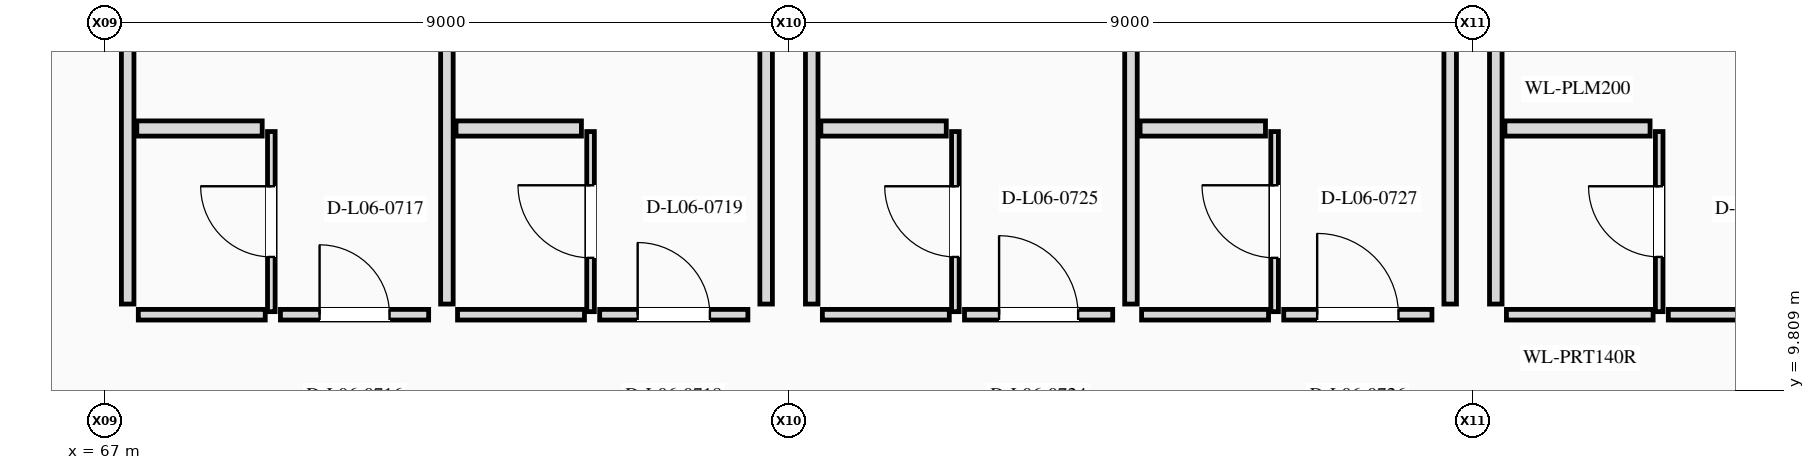
"""IFC4 building model, lengths in metres.
Left out: names, types, materials, properties, quantities, classifications, styles, units other than length and angle.
Written with IfcOpenShell. Run it as: python <this file> out.ifc"""

import sys

from ifc_helpers import new_model, si_unit, direction, frame, frame_2d, origin, place, context, subcontext, project, spatial, rectangle, extrude, element, fill, save


model = new_model("IFC4")
c1 = context("Model", 3, precision=1e-05, world=origin(), true_north=direction((0.0, 1.0)))
c2 = subcontext(c1, "Body", "Model", "MODEL_VIEW")
j1 = project(units=[si_unit("LENGTHUNIT", "METRE"), si_unit("PLANEANGLEUNIT", "RADIAN")], contexts=[c1])
p1 = place(None, origin())
s1 = spatial("IfcSite", under=j1, at=p1, CompositionType="ELEMENT")
p2 = place(p1, origin())
s2 = spatial("IfcBuilding", under=s1, at=p2, CompositionType="ELEMENT")
p3 = place(p2, frame((0.0, 0.0, 27.0)))
s3 = spatial("IfcBuildingStorey", under=s2, at=p3, CompositionType="ELEMENT", Elevation=27.0)
p4 = place(p3, frame((67.44, 10.8, 0.0), z_axis=(0.0, 0.0, 1.0), x_axis=(1.0, 0.0, 0.0)))
e1 = element("IfcWall", 1, at=p4, inside=s3, PredefinedType="PARTITIONING", context=c2, shape_type="SweptSolid", body=[
    extrude(rectangle(XDim=1.67, YDim=0.14, at=frame_2d((0.835, 0.0))), origin(), (0.0, 0.0, 1.0), 3.29),
])
p5 = place(p3, frame((69.31, 10.8, 0.0), z_axis=(0.0, 0.0, 1.0), x_axis=(1.0, 0.0, 0.0)))
e2 = element("IfcWall", 2, at=p5, inside=s3, PredefinedType="PARTITIONING", context=c2, shape_type="SweptSolid", body=[
    extrude(rectangle(XDim=1.95, YDim=0.14, at=frame_2d((0.975, 0.0))), origin(), (0.0, 0.0, 1.0), 3.29),
])
p6 = place(p5, frame((0.515, 0.0, 0.0)))
e3 = element("IfcOpeningElement", 3, at=p6, cuts=e2, PredefinedType="OPENING", context=c2, shape_type="SweptSolid", body=[
    extrude(rectangle(XDim=0.92, YDim=2.3, at=frame_2d((0.46, 1.15))), frame((0.0, 0.08, 0.0), z_axis=(0.0, -1.0, 0.0), x_axis=(1.0, 0.0, 0.0)), (0.0, 0.0, 1.0), 0.16),
])
p7 = place(p3, frame((67.3, 10.94, 0.0), z_axis=(0.0, 0.0, 1.0), x_axis=(0.0, 1.0, 0.0)))
e4 = element("IfcWall", 4, at=p7, inside=s3, PredefinedType="PARTITIONING", context=c2, shape_type="SweptSolid", body=[
    extrude(rectangle(XDim=8.012, YDim=0.165, at=frame_2d((4.006, 0.0))), origin(), (0.0, 0.0, 1.0), 2.619),
])
p8 = place(p3, frame((71.5, 10.94, 0.0), z_axis=(0.0, 0.0, 1.0), x_axis=(0.0, 1.0, 0.0)))
e5 = element("IfcWall", 5, at=p8, inside=s3, PredefinedType="PARTITIONING", context=c2, shape_type="SweptSolid", body=[
    extrude(rectangle(XDim=8.012, YDim=0.165, at=frame_2d((4.006, 0.0))), origin(), (0.0, 0.0, 1.0), 2.703),
])
p9 = place(p3, frame((69.19, 10.84, 0.0), z_axis=(0.0, 0.0, 1.0), x_axis=(0.0, 1.0, 0.0)))
e6 = element("IfcWall", 6, at=p9, inside=s3, PredefinedType="PARTITIONING", context=c2, shape_type="SweptSolid", body=[
    extrude(rectangle(XDim=2.37, YDim=0.1, at=frame_2d((1.185, 0.0))), origin(), (0.0, 0.0, 1.0), 2.898),
])
p10 = place(p9, frame((0.72, 0.0, 0.0)))
e7 = element("IfcOpeningElement", 7, at=p10, cuts=e6, PredefinedType="OPENING", context=c2, shape_type="SweptSolid", body=[
    extrude(rectangle(XDim=0.93, YDim=2.14, at=frame_2d((0.465, 1.07))), frame((0.0, 0.06, 0.0), z_axis=(0.0, -1.0, 0.0), x_axis=(1.0, 0.0, 0.0)), (0.0, 0.0, 1.0), 0.12),
])
p11 = place(p3, frame((67.42, 13.25, 0.0), z_axis=(0.0, 0.0, 1.0), x_axis=(1.0, 0.0, 0.0)))
e8 = element("IfcWall", 8, at=p11, inside=s3, PredefinedType="PLUMBINGWALL", context=c2, shape_type="SweptSolid", body=[
    extrude(rectangle(XDim=1.65, YDim=0.2, at=frame_2d((0.825, 0.0))), origin(), (0.0, 0.0, 1.0), 3.29),
])
p12 = place(p3, frame((71.64, 10.8, 0.0), z_axis=(0.0, 0.0, 1.0), x_axis=(1.0, 0.0, 0.0)))
e9 = element("IfcWall", 9, at=p12, inside=s3, PredefinedType="PARTITIONING", context=c2, shape_type="SweptSolid", body=[
    extrude(rectangle(XDim=1.67, YDim=0.14, at=frame_2d((0.835, 0.0))), origin(), (0.0, 0.0, 1.0), 3.29),
])
p13 = place(p3, frame((73.51, 10.8, 0.0), z_axis=(0.0, 0.0, 1.0), x_axis=(1.0, 0.0, 0.0)))
e10 = element("IfcWall", 10, at=p13, inside=s3, PredefinedType="PARTITIONING", context=c2, shape_type="SweptSolid", body=[
    extrude(rectangle(XDim=1.95, YDim=0.14, at=frame_2d((0.975, 0.0))), origin(), (0.0, 0.0, 1.0), 3.29),
])
p14 = place(p13, frame((0.5, 0.0, 0.0)))
e11 = element("IfcOpeningElement", 11, at=p14, cuts=e10, PredefinedType="OPENING", context=c2, shape_type="SweptSolid", body=[
    extrude(rectangle(XDim=0.95, YDim=2.3, at=frame_2d((0.475, 1.15))), frame((0.0, 0.08, 0.0), z_axis=(0.0, -1.0, 0.0), x_axis=(1.0, 0.0, 0.0)), (0.0, 0.0, 1.0), 0.16),
])
p15 = place(p3, frame((75.7, 10.94, 0.0), z_axis=(0.0, 0.0, 1.0), x_axis=(0.0, 1.0, 0.0)))
e12 = element("IfcWall", 12, at=p15, inside=s3, PredefinedType="PARTITIONING", context=c2, shape_type="SweptSolid", body=[
    extrude(rectangle(XDim=8.012, YDim=0.165, at=frame_2d((4.006, 0.0))), origin(), (0.0, 0.0, 1.0), 2.619),
])
p16 = place(p3, frame((73.39, 10.84, 0.0), z_axis=(0.0, 0.0, 1.0), x_axis=(0.0, 1.0, 0.0)))
e13 = element("IfcWall", 13, at=p16, inside=s3, PredefinedType="PARTITIONING", context=c2, shape_type="SweptSolid", body=[
    extrude(rectangle(XDim=2.37, YDim=0.1, at=frame_2d((1.185, 0.0))), origin(), (0.0, 0.0, 1.0), 2.898),
])
p17 = place(p16, frame((0.708, 0.0, 0.0)))
e14 = element("IfcOpeningElement", 14, at=p17, cuts=e13, PredefinedType="OPENING", context=c2, shape_type="SweptSolid", body=[
    extrude(rectangle(XDim=0.955, YDim=2.14, at=frame_2d((0.478, 1.07))), frame((0.0, 0.06, 0.0), z_axis=(0.0, -1.0, 0.0), x_axis=(1.0, 0.0, 0.0)), (0.0, 0.0, 1.0), 0.12),
])
p18 = place(p3, frame((71.62, 13.25, 0.0), z_axis=(0.0, 0.0, 1.0), x_axis=(1.0, 0.0, 0.0)))
e15 = element("IfcWall", 15, at=p18, inside=s3, PredefinedType="PLUMBINGWALL", context=c2, shape_type="SweptSolid", body=[
    extrude(rectangle(XDim=1.65, YDim=0.2, at=frame_2d((0.825, 0.0))), origin(), (0.0, 0.0, 1.0), 3.29),
])
p19 = place(p3, frame((76.44, 10.8, 0.0), z_axis=(0.0, 0.0, 1.0), x_axis=(1.0, 0.0, 0.0)))
e16 = element("IfcWall", 16, at=p19, inside=s3, PredefinedType="PARTITIONING", context=c2, shape_type="SweptSolid", body=[
    extrude(rectangle(XDim=1.67, YDim=0.14, at=frame_2d((0.835, 0.0))), origin(), (0.0, 0.0, 1.0), 3.29),
])
p20 = place(p3, frame((78.31, 10.8, 0.0), z_axis=(0.0, 0.0, 1.0), x_axis=(1.0, 0.0, 0.0)))
e17 = element("IfcWall", 17, at=p20, inside=s3, PredefinedType="PARTITIONING", context=c2, shape_type="SweptSolid", body=[
    extrude(rectangle(XDim=1.95, YDim=0.14, at=frame_2d((0.975, 0.0))), origin(), (0.0, 0.0, 1.0), 3.29),
])
p21 = place(p20, frame((0.455, 0.0, 0.0)))
e18 = element("IfcOpeningElement", 18, at=p21, cuts=e17, PredefinedType="OPENING", context=c2, shape_type="SweptSolid", body=[
    extrude(rectangle(XDim=1.04, YDim=2.4, at=frame_2d((0.52, 1.2))), frame((0.0, 0.08, 0.0), z_axis=(0.0, -1.0, 0.0), x_axis=(1.0, 0.0, 0.0)), (0.0, 0.0, 1.0), 0.16),
])
p22 = place(p3, frame((76.3, 10.94, 0.0), z_axis=(0.0, 0.0, 1.0), x_axis=(0.0, 1.0, 0.0)))
e19 = element("IfcWall", 19, at=p22, inside=s3, PredefinedType="PARTITIONING", context=c2, shape_type="SweptSolid", body=[
    extrude(rectangle(XDim=8.012, YDim=0.165, at=frame_2d((4.006, 0.0))), origin(), (0.0, 0.0, 1.0), 2.619),
])
p23 = place(p3, frame((80.5, 10.94, 0.0), z_axis=(0.0, 0.0, 1.0), x_axis=(0.0, 1.0, 0.0)))
e20 = element("IfcWall", 20, at=p23, inside=s3, PredefinedType="PARTITIONING", context=c2, shape_type="SweptSolid", body=[
    extrude(rectangle(XDim=8.012, YDim=0.165, at=frame_2d((4.006, 0.0))), origin(), (0.0, 0.0, 1.0), 2.703),
])
p24 = place(p3, frame((78.19, 10.84, 0.0), z_axis=(0.0, 0.0, 1.0), x_axis=(0.0, 1.0, 0.0)))
e21 = element("IfcWall", 21, at=p24, inside=s3, PredefinedType="PARTITIONING", context=c2, shape_type="SweptSolid", body=[
    extrude(rectangle(XDim=2.37, YDim=0.1, at=frame_2d((1.185, 0.0))), origin(), (0.0, 0.0, 1.0), 2.898),
])
p25 = place(p24, frame((0.72, 0.0, 0.0)))
e22 = element("IfcOpeningElement", 22, at=p25, cuts=e21, PredefinedType="OPENING", context=c2, shape_type="SweptSolid", body=[
    extrude(rectangle(XDim=0.93, YDim=2.22, at=frame_2d((0.465, 1.11))), frame((0.0, 0.06, 0.0), z_axis=(0.0, -1.0, 0.0), x_axis=(1.0, 0.0, 0.0)), (0.0, 0.0, 1.0), 0.12),
])
p26 = place(p3, frame((76.42, 13.25, 0.0), z_axis=(0.0, 0.0, 1.0), x_axis=(1.0, 0.0, 0.0)))
e23 = element("IfcWall", 23, at=p26, inside=s3, PredefinedType="PLUMBINGWALL", context=c2, shape_type="SweptSolid", body=[
    extrude(rectangle(XDim=1.65, YDim=0.2, at=frame_2d((0.825, 0.0))), origin(), (0.0, 0.0, 1.0), 3.29),
])
p27 = place(p3, frame((80.64, 10.8, 0.0), z_axis=(0.0, 0.0, 1.0), x_axis=(1.0, 0.0, 0.0)))
e24 = element("IfcWall", 24, at=p27, inside=s3, PredefinedType="PARTITIONING", context=c2, shape_type="SweptSolid", body=[
    extrude(rectangle(XDim=1.67, YDim=0.14, at=frame_2d((0.835, 0.0))), origin(), (0.0, 0.0, 1.0), 3.29),
])
p28 = place(p3, frame((82.51, 10.8, 0.0), z_axis=(0.0, 0.0, 1.0), x_axis=(1.0, 0.0, 0.0)))
e25 = element("IfcWall", 25, at=p28, inside=s3, PredefinedType="PARTITIONING", context=c2, shape_type="SweptSolid", body=[
    extrude(rectangle(XDim=1.95, YDim=0.14, at=frame_2d((0.975, 0.0))), origin(), (0.0, 0.0, 1.0), 3.29),
])
p29 = place(p28, frame((0.44, 0.0, 0.0)))
e26 = element("IfcOpeningElement", 26, at=p29, cuts=e25, PredefinedType="OPENING", context=c2, shape_type="SweptSolid", body=[
    extrude(rectangle(XDim=1.07, YDim=2.4, at=frame_2d((0.535, 1.2))), frame((0.0, 0.08, 0.0), z_axis=(0.0, -1.0, 0.0), x_axis=(1.0, 0.0, 0.0)), (0.0, 0.0, 1.0), 0.16),
])
p30 = place(p3, frame((84.7, 10.94, 0.0), z_axis=(0.0, 0.0, 1.0), x_axis=(0.0, 1.0, 0.0)))
e27 = element("IfcWall", 27, at=p30, inside=s3, PredefinedType="PARTITIONING", context=c2, shape_type="SweptSolid", body=[
    extrude(rectangle(XDim=8.012, YDim=0.165, at=frame_2d((4.006, 0.0))), origin(), (0.0, 0.0, 1.0), 2.619),
])
p31 = place(p3, frame((82.39, 10.84, 0.0), z_axis=(0.0, 0.0, 1.0), x_axis=(0.0, 1.0, 0.0)))
e28 = element("IfcWall", 28, at=p31, inside=s3, PredefinedType="PARTITIONING", context=c2, shape_type="SweptSolid", body=[
    extrude(rectangle(XDim=2.37, YDim=0.1, at=frame_2d((1.185, 0.0))), origin(), (0.0, 0.0, 1.0), 2.898),
])
p32 = place(p31, frame((0.708, 0.0, 0.0)))
e29 = element("IfcOpeningElement", 29, at=p32, cuts=e28, PredefinedType="OPENING", context=c2, shape_type="SweptSolid", body=[
    extrude(rectangle(XDim=0.955, YDim=2.22, at=frame_2d((0.478, 1.11))), frame((0.0, 0.06, 0.0), z_axis=(0.0, -1.0, 0.0), x_axis=(1.0, 0.0, 0.0)), (0.0, 0.0, 1.0), 0.12),
])
p33 = place(p3, frame((80.62, 13.25, 0.0), z_axis=(0.0, 0.0, 1.0), x_axis=(1.0, 0.0, 0.0)))
e30 = element("IfcWall", 30, at=p33, inside=s3, PredefinedType="PLUMBINGWALL", context=c2, shape_type="SweptSolid", body=[
    extrude(rectangle(XDim=1.65, YDim=0.2, at=frame_2d((0.825, 0.0))), origin(), (0.0, 0.0, 1.0), 3.29),
])
p34 = place(p3, frame((85.44, 10.8, 0.0), z_axis=(0.0, 0.0, 1.0), x_axis=(1.0, 0.0, 0.0)))
e31 = element("IfcWall", 31, at=p34, inside=s3, PredefinedType="PARTITIONING", context=c2, shape_type="SweptSolid", body=[
    extrude(rectangle(XDim=1.93, YDim=0.14, at=frame_2d((0.965, 0.0))), origin(), (0.0, 0.0, 1.0), 3.29),
])
p35 = place(p3, frame((87.57, 10.8, 0.0), z_axis=(0.0, 0.0, 1.0), x_axis=(1.0, 0.0, 0.0)))
e32 = element("IfcWall", 32, at=p35, inside=s3, PredefinedType="PARTITIONING", context=c2, shape_type="SweptSolid", body=[
    extrude(rectangle(XDim=3.19, YDim=0.14, at=frame_2d((1.595, 0.0))), origin(), (0.0, 0.0, 1.0), 3.29),
])
p36 = place(p35, frame((1.105, 0.0, 0.0)))
e33 = element("IfcOpeningElement", 33, at=p36, cuts=e32, PredefinedType="OPENING", context=c2, shape_type="SweptSolid", body=[
    extrude(rectangle(XDim=0.98, YDim=2.2, at=frame_2d((0.49, 1.1))), frame((0.0, 0.08, 0.0), z_axis=(0.0, -1.0, 0.0), x_axis=(1.0, 0.0, 0.0)), (0.0, 0.0, 1.0), 0.16),
])
p37 = place(p3, frame((85.3, 10.94, 0.0), z_axis=(0.0, 0.0, 1.0), x_axis=(0.0, 1.0, 0.0)))
e34 = element("IfcWall", 34, at=p37, inside=s3, PredefinedType="PARTITIONING", context=c2, shape_type="SweptSolid", body=[
    extrude(rectangle(XDim=8.012, YDim=0.165, at=frame_2d((4.006, 0.0))), origin(), (0.0, 0.0, 1.0), 2.619),
])
p38 = place(p3, frame((87.45, 10.84, 0.0), z_axis=(0.0, 0.0, 1.0), x_axis=(0.0, 1.0, 0.0)))
e35 = element("IfcWall", 35, at=p38, inside=s3, PredefinedType="PARTITIONING", context=c2, shape_type="SweptSolid", body=[
    extrude(rectangle(XDim=2.37, YDim=0.1, at=frame_2d((1.185, 0.0))), origin(), (0.0, 0.0, 1.0), 3.29),
])
p39 = place(p38, frame((0.72, 0.0, 0.0)))
e36 = element("IfcOpeningElement", 36, at=p39, cuts=e35, PredefinedType="OPENING", context=c2, shape_type="SweptSolid", body=[
    extrude(rectangle(XDim=0.93, YDim=2.14, at=frame_2d((0.465, 1.07))), frame((0.0, 0.06, 0.0), z_axis=(0.0, -1.0, 0.0), x_axis=(1.0, 0.0, 0.0)), (0.0, 0.0, 1.0), 0.12),
])
p40 = place(p3, frame((85.42, 13.25, 0.0), z_axis=(0.0, 0.0, 1.0), x_axis=(1.0, 0.0, 0.0)))
e37 = element("IfcWall", 37, at=p40, inside=s3, PredefinedType="PLUMBINGWALL", context=c2, shape_type="SweptSolid", body=[
    extrude(rectangle(XDim=1.91, YDim=0.2, at=frame_2d((0.955, 0.0))), origin(), (0.0, 0.0, 1.0), 3.29),
])
p41 = place(p6, origin())
e38 = element("IfcDoor", 38, at=p41, inside=s3, OperationType="SINGLE_SWING_LEFT", PredefinedType="DOOR", context=c2, shape_type="SweptSolid", body=[
    extrude(rectangle(XDim=0.92, YDim=2.3, at=frame_2d((0.46, 1.15))), frame((0.0, 0.025, 0.0), z_axis=(0.0, -1.0, 0.0), x_axis=(1.0, 0.0, 0.0)), (0.0, 0.0, 1.0), 0.05),
])
fill(e3, e38)
p42 = place(p10, origin())
e39 = element("IfcDoor", 39, at=p42, inside=s3, OperationType="SINGLE_SWING_RIGHT", PredefinedType="DOOR", context=c2, shape_type="SweptSolid", body=[
    extrude(rectangle(XDim=0.93, YDim=2.14, at=frame_2d((0.465, 1.07))), frame((0.0, 0.025, 0.0), z_axis=(0.0, -1.0, 0.0), x_axis=(1.0, 0.0, 0.0)), (0.0, 0.0, 1.0), 0.05),
])
fill(e7, e39)
p43 = place(p14, origin())
e40 = element("IfcDoor", 40, at=p43, inside=s3, OperationType="SINGLE_SWING_LEFT", PredefinedType="DOOR", context=c2, shape_type="SweptSolid", body=[
    extrude(rectangle(XDim=0.95, YDim=2.3, at=frame_2d((0.475, 1.15))), frame((0.0, 0.025, 0.0), z_axis=(0.0, -1.0, 0.0), x_axis=(1.0, 0.0, 0.0)), (0.0, 0.0, 1.0), 0.05),
])
fill(e11, e40)
p44 = place(p17, origin())
e41 = element("IfcDoor", 41, at=p44, inside=s3, OperationType="SINGLE_SWING_RIGHT", PredefinedType="DOOR", context=c2, shape_type="SweptSolid", body=[
    extrude(rectangle(XDim=0.955, YDim=2.14, at=frame_2d((0.478, 1.07))), frame((0.0, 0.025, 0.0), z_axis=(0.0, -1.0, 0.0), x_axis=(1.0, 0.0, 0.0)), (0.0, 0.0, 1.0), 0.05),
])
fill(e14, e41)
p45 = place(p21, origin())
e42 = element("IfcDoor", 42, at=p45, inside=s3, OperationType="SINGLE_SWING_LEFT", PredefinedType="DOOR", context=c2, shape_type="SweptSolid", body=[
    extrude(rectangle(XDim=1.04, YDim=2.4, at=frame_2d((0.52, 1.2))), frame((0.0, 0.025, 0.0), z_axis=(0.0, -1.0, 0.0), x_axis=(1.0, 0.0, 0.0)), (0.0, 0.0, 1.0), 0.05),
])
fill(e18, e42)
p46 = place(p25, origin())
e43 = element("IfcDoor", 43, at=p46, inside=s3, OperationType="SINGLE_SWING_RIGHT", PredefinedType="DOOR", context=c2, shape_type="SweptSolid", body=[
    extrude(rectangle(XDim=0.93, YDim=2.22, at=frame_2d((0.465, 1.11))), frame((0.0, 0.025, 0.0), z_axis=(0.0, -1.0, 0.0), x_axis=(1.0, 0.0, 0.0)), (0.0, 0.0, 1.0), 0.05),
])
fill(e22, e43)
p47 = place(p29, origin())
e44 = element("IfcDoor", 44, at=p47, inside=s3, OperationType="SINGLE_SWING_LEFT", PredefinedType="DOOR", context=c2, shape_type="SweptSolid", body=[
    extrude(rectangle(XDim=1.07, YDim=2.4, at=frame_2d((0.535, 1.2))), frame((0.0, 0.025, 0.0), z_axis=(0.0, -1.0, 0.0), x_axis=(1.0, 0.0, 0.0)), (0.0, 0.0, 1.0), 0.05),
])
fill(e26, e44)
p48 = place(p32, origin())
e45 = element("IfcDoor", 45, at=p48, inside=s3, OperationType="SINGLE_SWING_RIGHT", PredefinedType="DOOR", context=c2, shape_type="SweptSolid", body=[
    extrude(rectangle(XDim=0.955, YDim=2.22, at=frame_2d((0.478, 1.11))), frame((0.0, 0.025, 0.0), z_axis=(0.0, -1.0, 0.0), x_axis=(1.0, 0.0, 0.0)), (0.0, 0.0, 1.0), 0.05),
])
fill(e29, e45)
p49 = place(p39, origin())
e46 = element("IfcDoor", 46, at=p49, inside=s3, OperationType="SINGLE_SWING_RIGHT", PredefinedType="DOOR", context=c2, shape_type="SweptSolid", body=[
    extrude(rectangle(XDim=0.93, YDim=2.14, at=frame_2d((0.465, 1.07))), frame((0.0, 0.025, 0.0), z_axis=(0.0, -1.0, 0.0), x_axis=(1.0, 0.0, 0.0)), (0.0, 0.0, 1.0), 0.05),
])
fill(e36, e46)
save(model, sys.argv[1])
